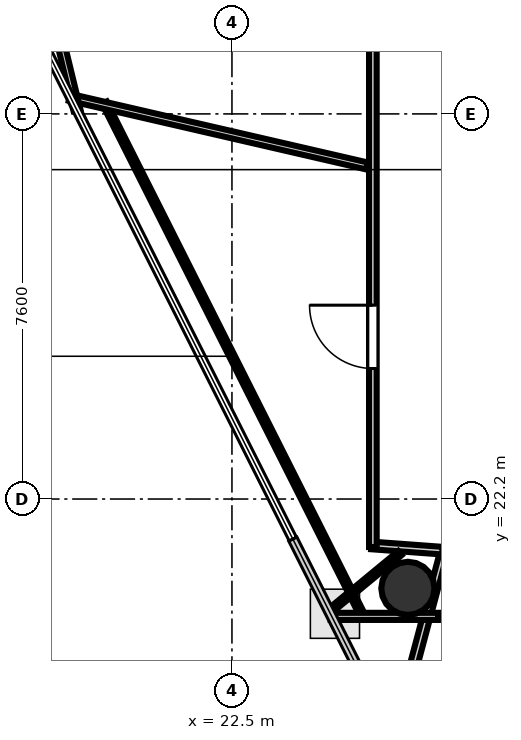
"""IFC4 building model, lengths in metres.
Left out: names, types, materials, properties, quantities, classifications, styles, units other than length and angle.
Written with IfcOpenShell. Run it as: python <this file> out.ifc"""

import sys

from ifc_helpers import new_model, si_unit, direction, frame, frame_2d, origin, origin_2d, place, context, subcontext, project, spatial, rectangle, hollow_circle, extrude, element, fill, save


model = new_model("IFC4")
c1 = context("Model", 3, precision=1e-05, world=origin(), true_north=direction((0.0, 1.0)))
c2 = subcontext(c1, "Body", "Model", "MODEL_VIEW")
j1 = project(units=[si_unit("LENGTHUNIT", "METRE"), si_unit("PLANEANGLEUNIT", "RADIAN")], contexts=[c1])
p1 = place(None, origin())
s1 = spatial("IfcSite", under=j1, at=p1, CompositionType="ELEMENT")
p2 = place(p1, origin())
s2 = spatial("IfcBuilding", under=s1, at=p2, CompositionType="ELEMENT")
p3 = place(p2, frame((0.0, 0.0, 261.2)))
s3 = spatial("IfcBuildingStorey", under=s2, at=p3, CompositionType="ELEMENT", Elevation=261.2)
p4 = place(p3, frame((25.972, 20.437, 0.0), z_axis=(0.0, 0.0, 1.0), x_axis=(1.0, 0.0, 0.0)))
e1 = element("IfcColumn", 1, at=p4, inside=s3, PredefinedType="COLUMN", context=c2, shape_type="SweptSolid", body=[
    extrude(hollow_circle(Radius=0.525, WallThickness=0.028, at=origin_2d()), origin(), (0.0, 0.0, 1.0), 3.7),
])
p5 = place(p3, frame((25.693, 17.453, 0.0), z_axis=(0.0, 0.0, 1.0), x_axis=(0.258115276845, 0.966114125691, 0.0)))
e2 = element("IfcWall", 2, at=p5, inside=s3, PredefinedType="PARTITIONING", context=c2, shape_type="SweptSolid", body=[
    extrude(rectangle(XDim=3.827, YDim=0.15, at=frame_2d((1.914, 0.0))), origin(), (0.0, 0.0, 1.0), 2.84),
])
p6 = place(p3, frame((26.652, 21.181, 0.0), z_axis=(0.0, 0.0, 1.0), x_axis=(-0.997303696291, 0.073384857861, 0.0)))
e3 = element("IfcWall", 3, at=p6, inside=s3, PredefinedType="PARTITIONING", context=c2, shape_type="SweptSolid", body=[
    extrude(rectangle(XDim=1.404, YDim=0.15, at=frame_2d((0.702, 0.0))), origin(), (0.0, 0.0, 1.0), 2.84),
])
p7 = place(p3, frame((25.281, 21.253, 0.0), z_axis=(0.0, 0.0, 1.0), x_axis=(0.0, 1.0, 0.0)))
e4 = element("IfcWall", 4, at=p7, inside=s3, PredefinedType="PARTITIONING", context=c2, shape_type="SweptSolid", body=[
    extrude(rectangle(XDim=11.297, YDim=0.15, at=frame_2d((5.648, 0.0))), origin(), (0.0, 0.0, 1.0), 2.84),
])
p8 = place(p7, frame((3.522, 0.0, 0.0)))
e5 = element("IfcOpeningElement", 5, at=p8, cuts=e4, PredefinedType="OPENING", context=c2, shape_type="SweptSolid", body=[
    extrude(rectangle(XDim=1.25, YDim=2.2, at=frame_2d((0.625, 1.1))), frame((0.0, 0.085, 0.0), z_axis=(0.0, -1.0, 0.0), x_axis=(1.0, 0.0, 0.0)), (0.0, 0.0, 1.0), 0.17),
])
p9 = place(p3, frame((25.814, 21.132, 0.0), z_axis=(0.0, 0.0, 1.0), x_axis=(-0.771278190756, -0.636498195177, 0.0)))
e6 = element("IfcWall", 6, at=p9, inside=s3, PredefinedType="PARTITIONING", context=c2, shape_type="SweptSolid", body=[
    extrude(rectangle(XDim=1.828, YDim=0.105, at=frame_2d((0.914, 0.0))), origin(), (0.0, 0.0, 1.0), 2.84),
])
p10 = place(p3, frame((25.021, 20.013, 0.0), z_axis=(0.0, 0.0, 1.0), x_axis=(-0.449626242434, 0.893216794577, 0.0)))
e7 = element("IfcWall", 7, at=p10, inside=s3, PredefinedType="PARTITIONING", context=c2, shape_type="SweptSolid", body=[
    extrude(rectangle(XDim=11.205, YDim=0.105, at=frame_2d((5.602, 0.0))), origin(), (0.0, 0.0, 1.0), 2.84),
])
p11 = place(p3, frame((19.295, 30.128, 0.0), z_axis=(0.0, 0.0, 1.0), x_axis=(0.974367275429, -0.22496313603, 0.0)))
e8 = element("IfcWall", 8, at=p11, inside=s3, PredefinedType="PARTITIONING", context=c2, shape_type="SweptSolid", body=[
    extrude(rectangle(XDim=6.022, YDim=0.14, at=frame_2d((3.011, 0.0))), origin(), (0.0, 0.0, 1.0), 2.84),
])
p12 = place(p3, frame((24.449, 19.884, 0.0), z_axis=(0.0, 0.0, 1.0), x_axis=(1.0, 0.0, 0.0)))
e9 = element("IfcWall", 9, at=p12, inside=s3, PredefinedType="PARTITIONING", context=c2, shape_type="SweptSolid", body=[
    extrude(rectangle(XDim=2.121, YDim=0.14, at=frame_2d((1.061, 0.0))), origin(), (0.0, 0.0, 1.0), 2.84),
])
p13 = place(p3, frame((19.442, 29.871, 0.0), z_axis=(0.0, 0.0, 1.0), x_axis=(-0.235757878446, 0.971811824764, 0.0)))
e10 = element("IfcWall", 10, at=p13, inside=s3, PredefinedType="PARTITIONING", context=c2, shape_type="SweptSolid", body=[
    extrude(rectangle(XDim=2.435, YDim=0.14, at=frame_2d((1.217, 0.0))), origin(), (0.0, 0.0, 1.0), 2.84),
])
p14 = place(p8, origin())
e11 = element("IfcDoor", 11, at=p14, inside=s3, OperationType="SINGLE_SWING_RIGHT", PredefinedType="DOOR", context=c2, shape_type="SweptSolid", body=[
    extrude(rectangle(XDim=1.25, YDim=2.2, at=frame_2d((0.625, 1.1))), frame((0.0, 0.025, 0.0), z_axis=(0.0, -1.0, 0.0), x_axis=(1.0, 0.0, 0.0)), (0.0, 0.0, 1.0), 0.05),
])
fill(e5, e11)
save(model, sys.argv[1])
